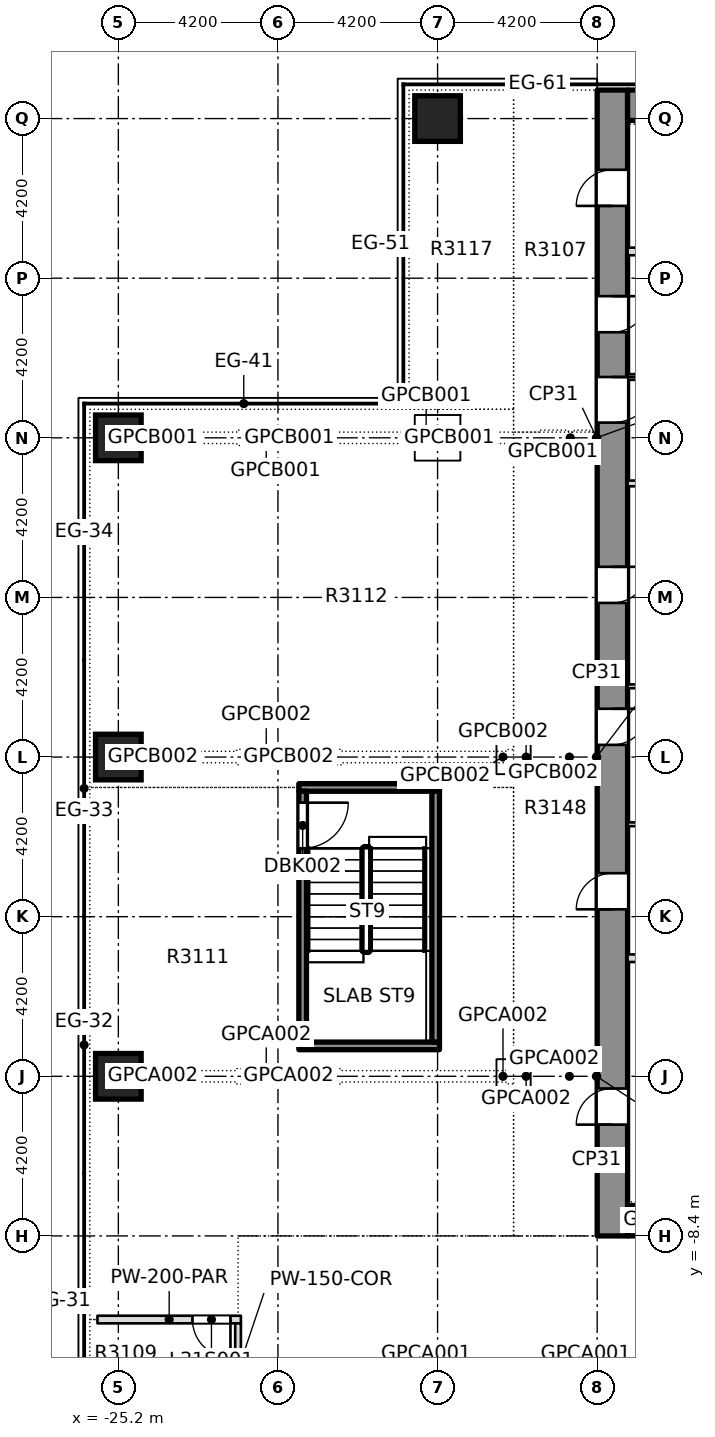
"""IFC4 building model, lengths in metres.
Left out: names, types, materials, properties, quantities, classifications, styles, units other than length and angle.
Written with IfcOpenShell. Run it as: python <this file> out.ifc"""

import sys

from ifc_helpers import new_model, si_unit, direction, frame, frame_2d, origin, origin_2d, place, context, subcontext, project, spatial, rectangle, extrude, element, fill, save


model = new_model("IFC4")
c1 = context("Model", 3, precision=1e-05, world=origin(), true_north=direction((0.0, 1.0)))
c2 = subcontext(c1, "Body", "Model", "MODEL_VIEW")
j1 = project(units=[si_unit("LENGTHUNIT", "METRE"), si_unit("PLANEANGLEUNIT", "RADIAN")], contexts=[c1])
p1 = place(None, origin())
s1 = spatial("IfcSite", under=j1, at=p1, CompositionType="ELEMENT")
p2 = place(p1, origin())
s2 = spatial("IfcBuilding", under=s1, at=p2, CompositionType="ELEMENT")
p3 = place(p2, frame((0.0, 0.0, 121.8)))
s3 = spatial("IfcBuildingStorey", under=s2, at=p3, CompositionType="ELEMENT", Elevation=121.8)
p4 = place(p3, frame((-12.2, -8.4, 0.0), z_axis=(0.0, 0.0, 1.0), x_axis=(0.0, 1.0, 0.0)))
e1 = element("IfcWall", 1, at=p4, inside=s3, PredefinedType="SHEAR", context=c2, shape_type="SweptSolid", body=[
    extrude(rectangle(XDim=30.15, YDim=0.8, at=frame_2d((15.075, 0.0))), origin(), (0.0, 0.0, 1.0), 6.1),
])
p5 = place(p4, frame((2.928, 0.0, 0.0)))
e2 = element("IfcOpeningElement", 2, at=p5, cuts=e1, PredefinedType="OPENING", context=c2, shape_type="SweptSolid", body=[
    extrude(rectangle(XDim=0.95, YDim=2.1, at=frame_2d((0.475, 1.05))), frame((0.0, 0.41, 0.0), z_axis=(0.0, -1.0, 0.0), x_axis=(1.0, 0.0, 0.0)), (0.0, 0.0, 1.0), 0.82),
])
p6 = place(p4, frame((8.594, 0.0, 0.0)))
e3 = element("IfcOpeningElement", 3, at=p6, cuts=e1, PredefinedType="OPENING", context=c2, shape_type="SweptSolid", body=[
    extrude(rectangle(XDim=0.95, YDim=2.1, at=frame_2d((0.475, 1.05))), frame((0.0, 0.41, 0.0), z_axis=(0.0, -1.0, 0.0), x_axis=(1.0, 0.0, 0.0)), (0.0, 0.0, 1.0), 0.82),
])
p7 = place(p4, frame((12.921, 0.0, 0.0)))
e4 = element("IfcOpeningElement", 4, at=p7, cuts=e1, PredefinedType="OPENING", context=c2, shape_type="SweptSolid", body=[
    extrude(rectangle(XDim=0.95, YDim=2.1, at=frame_2d((0.475, 1.05))), frame((0.0, 0.41, 0.0), z_axis=(0.0, -1.0, 0.0), x_axis=(1.0, 0.0, 0.0)), (0.0, 0.0, 1.0), 0.82),
])
p8 = place(p4, frame((16.656, 0.0, 0.0)))
e5 = element("IfcOpeningElement", 5, at=p8, cuts=e1, PredefinedType="OPENING", context=c2, shape_type="SweptSolid", body=[
    extrude(rectangle(XDim=0.95, YDim=2.1, at=frame_2d((0.475, 1.05))), frame((0.0, 0.41, 0.0), z_axis=(0.0, -1.0, 0.0), x_axis=(1.0, 0.0, 0.0)), (0.0, 0.0, 1.0), 0.82),
])
p9 = place(p4, frame((23.777, 0.0, 0.0)))
e6 = element("IfcOpeningElement", 6, at=p9, cuts=e1, PredefinedType="OPENING", context=c2, shape_type="SweptSolid", body=[
    extrude(rectangle(XDim=0.95, YDim=2.1, at=frame_2d((0.475, 1.05))), frame((0.0, 0.41, 0.0), z_axis=(0.0, -1.0, 0.0), x_axis=(1.0, 0.0, 0.0)), (0.0, 0.0, 1.0), 0.82),
])
p10 = place(p4, frame((27.102, 0.0, 0.0)))
e7 = element("IfcOpeningElement", 7, at=p10, cuts=e1, PredefinedType="OPENING", context=c2, shape_type="SweptSolid", body=[
    extrude(rectangle(XDim=0.95, YDim=2.1, at=frame_2d((0.475, 1.05))), frame((0.0, 0.41, 0.0), z_axis=(0.0, -1.0, 0.0), x_axis=(1.0, 0.0, 0.0)), (0.0, 0.0, 1.0), 0.82),
])
p11 = place(p4, frame((21.4, 0.0, 0.0)))
e8 = element("IfcOpeningElement", 8, at=p11, cuts=e1, PredefinedType="OPENING", context=c2, shape_type="SweptSolid", body=[
    extrude(rectangle(XDim=1.2, YDim=2.1, at=frame_2d((0.6, 1.05))), frame((0.0, 0.41, 0.0), z_axis=(0.0, -1.0, 0.0), x_axis=(1.0, 0.0, 0.0)), (0.0, 0.0, 1.0), 0.82),
])
p12 = place(p3, frame((-11.8, -8.0, 0.0), z_axis=(0.0, 0.0, 1.0), x_axis=(1.0, 0.0, 0.0)))
e9 = element("IfcWall", 9, at=p12, inside=s3, PredefinedType="SHEAR", context=c2, shape_type="SweptSolid", body=[
    extrude(rectangle(XDim=23.6, YDim=0.8, at=frame_2d((11.8, 0.0))), origin(), (0.0, 0.0, 1.0), 6.1),
])
p13 = place(p12, frame((7.05, 0.0, 0.0)))
e10 = element("IfcOpeningElement", 10, at=p13, cuts=e9, PredefinedType="OPENING", context=c2, shape_type="SweptSolid", body=[
    extrude(rectangle(XDim=1.8, YDim=2.1, at=frame_2d((0.9, 1.05))), frame((0.0, 0.41, 0.0), z_axis=(0.0, -1.0, 0.0), x_axis=(1.0, 0.0, 0.0)), (0.0, 0.0, 1.0), 0.82),
])
p14 = place(p12, frame((14.75, 0.0, 0.0)))
e11 = element("IfcOpeningElement", 11, at=p14, cuts=e9, PredefinedType="OPENING", context=c2, shape_type="SweptSolid", body=[
    extrude(rectangle(XDim=1.8, YDim=2.1, at=frame_2d((0.9, 1.05))), frame((0.0, 0.41, 0.0), z_axis=(0.0, -1.0, 0.0), x_axis=(1.0, 0.0, 0.0)), (0.0, 0.0, 1.0), 0.82),
])
p15 = place(p3, frame((-11.8, 21.35, 0.0), z_axis=(0.0, 0.0, 1.0), x_axis=(1.0, 0.0, 0.0)))
e12 = element("IfcWall", 12, at=p15, inside=s3, PredefinedType="SHEAR", context=c2, shape_type="SweptSolid", body=[
    extrude(rectangle(XDim=23.6, YDim=0.8, at=frame_2d((11.8, 0.0))), origin(), (0.0, 0.0, 1.0), 6.1),
])
for number, where, z_axis, x_axis in (
    (13, (-25.2, -4.2, -0.45), (0.0, 0.0, 1.0), (1.0, 0.0, 0.0)),
    (14, (-25.2, 4.2, -0.45), (0.0, 0.0, 1.0), (1.0, 0.0, 0.0)),
    (15, (-25.2, 12.6, -0.45), (0.0, 0.0, 1.0), (1.0, 0.0, 0.0)),
    (16, (-16.8, 21.0, -0.45), (0.0, 0.0, 1.0), (1.0, 0.0, 0.0)),
):
    element("IfcColumn", number, at=place(p3, frame(where, z_axis=z_axis, x_axis=x_axis)), inside=s3, PredefinedType="COLUMN", context=c2, shape_type="SweptSolid", body=[
        extrude(rectangle(XDim=1.2, YDim=1.2, at=origin_2d()), origin(), (0.0, 0.0, 1.0), 6.55),
    ])
p16 = place(p3, frame((-25.75, -10.6, 0.0), z_axis=(0.0, 0.0, 1.0), x_axis=(1.0, 0.0, 0.0)))
e17 = element("IfcWall", 17, at=p16, inside=s3, PredefinedType="PARTITIONING", context=c2, shape_type="SweptSolid", body=[
    extrude(rectangle(XDim=3.775, YDim=0.2, at=frame_2d((1.887, 0.0))), origin(), (0.0, 0.0, 1.0), 6.1),
])
p17 = place(p16, frame((2.5, 0.0, 0.0)))
e18 = element("IfcOpeningElement", 18, at=p17, cuts=e17, PredefinedType="OPENING", context=c2, shape_type="SweptSolid", body=[
    extrude(rectangle(XDim=1.0, YDim=2.1, at=frame_2d((0.5, 1.05))), frame((0.0, 0.11, 0.0), z_axis=(0.0, -1.0, 0.0), x_axis=(1.0, 0.0, 0.0)), (0.0, 0.0, 1.0), 0.22),
])
p18 = place(p3, frame((-22.05, -13.15, 0.0), z_axis=(0.0, 0.0, 1.0), x_axis=(0.0, 1.0, 0.0)))
e19 = element("IfcWall", 19, at=p18, inside=s3, PredefinedType="PARTITIONING", context=c2, shape_type="SweptSolid", body=[
    extrude(rectangle(XDim=2.45, YDim=0.15, at=frame_2d((1.225, 0.0))), origin(), (0.0, 0.0, 1.0), 6.1),
])
p19 = place(p3, frame((-11.799, -1.093, 0.0), z_axis=(0.0, 0.0, 1.0), x_axis=(1.0, 0.0, 0.0)))
e20 = element("IfcWall", 20, at=p19, inside=s3, PredefinedType="PARTITIONING", context=c2, shape_type="SweptSolid", body=[
    extrude(rectangle(XDim=2.998, YDim=0.2, at=frame_2d((1.499, 0.0))), origin(), (0.0, 0.0, 1.0), 6.1),
])
for number, where, z_axis, x_axis in (
    (21, (-11.799, 2.431, 0.0), (0.0, 0.0, 1.0), (1.0, 0.0, 0.0)),
    (22, (-11.799, 6.061, 0.0), (0.0, 0.0, 1.0), (1.0, 0.0, 0.0)),
):
    element("IfcWall", number, at=place(p3, frame(where, z_axis=z_axis, x_axis=x_axis)), inside=s3, PredefinedType="PARTITIONING", context=c2, shape_type="SweptSolid", body=[
        extrude(rectangle(XDim=2.998, YDim=0.1, at=frame_2d((1.499, 0.0))), origin(), (0.0, 0.0, 1.0), 6.1),
    ])
for number, where, z_axis, x_axis in (
    (23, (-11.799, 11.4, 0.0), (0.0, 0.0, 1.0), (1.0, 0.0, 0.0)),
    (24, (-11.799, 14.2, 0.0), (0.0, 0.0, 1.0), (1.0, 0.0, 0.0)),
):
    element("IfcWall", number, at=place(p3, frame(where, z_axis=z_axis, x_axis=x_axis)), inside=s3, PredefinedType="PARTITIONING", context=c2, shape_type="SweptSolid", body=[
        extrude(rectangle(XDim=2.998, YDim=0.15, at=frame_2d((1.499, 0.0))), origin(), (0.0, 0.0, 1.0), 6.1),
    ])
p20 = place(p3, frame((-11.799, 17.504, 0.0), z_axis=(0.0, 0.0, 1.0), x_axis=(1.0, 0.0, 0.0)))
e25 = element("IfcWall", 25, at=p20, inside=s3, PredefinedType="PARTITIONING", context=c2, shape_type="SweptSolid", body=[
    extrude(rectangle(XDim=2.998, YDim=0.2, at=frame_2d((1.499, 0.0))), origin(), (0.0, 0.0, 1.0), 6.1),
])
for number, where, z_axis, x_axis in (
    (26, (-20.45, -3.4, 0.0), (0.0, 0.0, 1.0), (1.0, 0.0, 0.0)),
    (27, (-20.45, 3.4, 0.0), (0.0, 0.0, 1.0), (1.0, 0.0, 0.0)),
):
    element("IfcWall", number, at=place(p3, frame(where, z_axis=z_axis, x_axis=x_axis)), inside=s3, PredefinedType="SOLIDWALL", context=c2, shape_type="SweptSolid", body=[
        extrude(rectangle(XDim=3.7, YDim=0.2, at=frame_2d((1.85, 0.0))), origin(), (0.0, 0.0, 1.0), 6.1),
    ])
p21 = place(p3, frame((-20.35, -3.3, 0.0), z_axis=(0.0, 0.0, 1.0), x_axis=(0.0, 1.0, 0.0)))
e28 = element("IfcWall", 28, at=p21, inside=s3, PredefinedType="SOLIDWALL", context=c2, shape_type="SweptSolid", body=[
    extrude(rectangle(XDim=6.6, YDim=0.2, at=frame_2d((3.3, 0.0))), origin(), (0.0, 0.0, 1.0), 6.1),
])
p22 = place(p21, frame((5.1, 0.0, 0.0)))
e29 = element("IfcOpeningElement", 29, at=p22, cuts=e28, PredefinedType="OPENING", context=c2, shape_type="SweptSolid", body=[
    extrude(rectangle(XDim=1.2, YDim=2.1, at=frame_2d((0.6, 1.05))), frame((0.0, 0.11, 0.0), z_axis=(0.0, -1.0, 0.0), x_axis=(1.0, 0.0, 0.0)), (0.0, 0.0, 1.0), 0.22),
])
p23 = place(p3, frame((-16.85, -3.3, 0.0), z_axis=(0.0, 0.0, 1.0), x_axis=(0.0, 1.0, 0.0)))
e30 = element("IfcWall", 30, at=p23, inside=s3, PredefinedType="SOLIDWALL", context=c2, shape_type="SweptSolid", body=[
    extrude(rectangle(XDim=6.6, YDim=0.2, at=frame_2d((3.3, 0.0))), origin(), (0.0, 0.0, 1.0), 6.1),
])
p24 = place(p17, origin())
e31 = element("IfcDoor", 31, at=p24, inside=s3, OperationType="SINGLE_SWING_LEFT", PredefinedType="DOOR", context=c2, shape_type="SweptSolid", body=[
    extrude(rectangle(XDim=1.0, YDim=2.1, at=frame_2d((0.5, 1.05))), frame((0.0, 0.025, 0.0), z_axis=(0.0, -1.0, 0.0), x_axis=(1.0, 0.0, 0.0)), (0.0, 0.0, 1.0), 0.05),
])
fill(e18, e31)
p25 = place(p5, origin())
e32 = element("IfcDoor", 32, at=p25, inside=s3, OperationType="SINGLE_SWING_LEFT", PredefinedType="DOOR", context=c2, shape_type="SweptSolid", body=[
    extrude(rectangle(XDim=0.95, YDim=2.1, at=frame_2d((0.475, 1.05))), frame((0.0, 0.025, 0.0), z_axis=(0.0, -1.0, 0.0), x_axis=(1.0, 0.0, 0.0)), (0.0, 0.0, 1.0), 0.05),
])
fill(e2, e32)
p26 = place(p6, origin())
e33 = element("IfcDoor", 33, at=p26, inside=s3, OperationType="SINGLE_SWING_LEFT", PredefinedType="DOOR", context=c2, shape_type="SweptSolid", body=[
    extrude(rectangle(XDim=0.95, YDim=2.1, at=frame_2d((0.475, 1.05))), frame((0.0, 0.025, 0.0), z_axis=(0.0, -1.0, 0.0), x_axis=(1.0, 0.0, 0.0)), (0.0, 0.0, 1.0), 0.05),
])
fill(e3, e33)
p27 = place(p7, origin())
e34 = element("IfcDoor", 34, at=p27, inside=s3, OperationType="SINGLE_SWING_LEFT", PredefinedType="DOOR", context=c2, shape_type="SweptSolid", body=[
    extrude(rectangle(XDim=0.95, YDim=2.1, at=frame_2d((0.475, 1.05))), frame((0.0, 0.025, 0.0), z_axis=(0.0, -1.0, 0.0), x_axis=(1.0, 0.0, 0.0)), (0.0, 0.0, 1.0), 0.05),
])
fill(e4, e34)
p28 = place(p8, origin())
e35 = element("IfcDoor", 35, at=p28, inside=s3, OperationType="SINGLE_SWING_LEFT", PredefinedType="DOOR", context=c2, shape_type="SweptSolid", body=[
    extrude(rectangle(XDim=0.95, YDim=2.1, at=frame_2d((0.475, 1.05))), frame((0.0, 0.025, 0.0), z_axis=(0.0, -1.0, 0.0), x_axis=(1.0, 0.0, 0.0)), (0.0, 0.0, 1.0), 0.05),
])
fill(e5, e35)
p29 = place(p9, origin())
e36 = element("IfcDoor", 36, at=p29, inside=s3, OperationType="SINGLE_SWING_LEFT", PredefinedType="DOOR", context=c2, shape_type="SweptSolid", body=[
    extrude(rectangle(XDim=0.95, YDim=2.1, at=frame_2d((0.475, 1.05))), frame((0.0, 0.025, 0.0), z_axis=(0.0, -1.0, 0.0), x_axis=(1.0, 0.0, 0.0)), (0.0, 0.0, 1.0), 0.05),
])
fill(e6, e36)
p30 = place(p10, origin())
e37 = element("IfcDoor", 37, at=p30, inside=s3, OperationType="SINGLE_SWING_LEFT", PredefinedType="DOOR", context=c2, shape_type="SweptSolid", body=[
    extrude(rectangle(XDim=0.95, YDim=2.1, at=frame_2d((0.475, 1.05))), frame((0.0, 0.025, 0.0), z_axis=(0.0, -1.0, 0.0), x_axis=(1.0, 0.0, 0.0)), (0.0, 0.0, 1.0), 0.05),
])
fill(e7, e37)
p31 = place(p11, origin())
e38 = element("IfcDoor", 38, at=p31, inside=s3, OperationType="SINGLE_SWING_LEFT", PredefinedType="DOOR", context=c2, shape_type="SweptSolid", body=[
    extrude(rectangle(XDim=1.2, YDim=2.1, at=frame_2d((0.6, 1.05))), frame((0.0, 0.025, 0.0), z_axis=(0.0, -1.0, 0.0), x_axis=(1.0, 0.0, 0.0)), (0.0, 0.0, 1.0), 0.05),
])
fill(e8, e38)
p32 = place(p22, origin())
e39 = element("IfcDoor", 39, at=p32, inside=s3, OperationType="SINGLE_SWING_LEFT", PredefinedType="DOOR", context=c2, shape_type="SweptSolid", body=[
    extrude(rectangle(XDim=1.2, YDim=2.1, at=frame_2d((0.6, 1.05))), frame((0.0, 0.025, 0.0), z_axis=(0.0, -1.0, 0.0), x_axis=(1.0, 0.0, 0.0)), (0.0, 0.0, 1.0), 0.05),
])
fill(e29, e39)
save(model, sys.argv[1])
